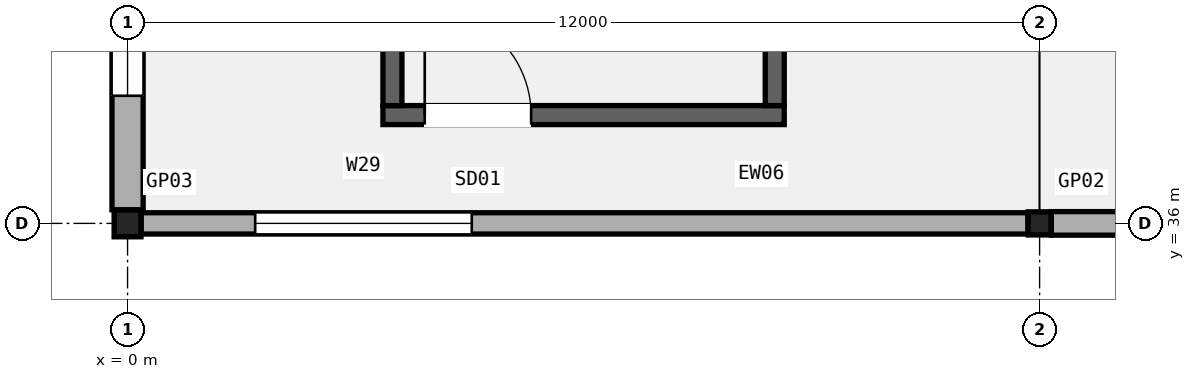
"""IFC4 building model, lengths in metres.
Left out: names, types, materials, properties, quantities, classifications, styles, units other than length and angle.
Written with IfcOpenShell. Run it as: python <this file> out.ifc"""

import sys

from ifc_helpers import new_model, si_unit, direction, frame, frame_2d, origin, origin_2d, place, context, subcontext, project, spatial, rectangle, hollow_rectangle, extrude, element, fill, save


model = new_model("IFC4")
c1 = context("Model", 3, precision=1e-05, world=origin(), true_north=direction((0.0, 1.0)))
c2 = subcontext(c1, "Body", "Model", "MODEL_VIEW")
j1 = project(units=[si_unit("LENGTHUNIT", "METRE"), si_unit("PLANEANGLEUNIT", "RADIAN")], contexts=[c1])
p1 = place(None, origin())
s1 = spatial("IfcSite", under=j1, at=p1, CompositionType="ELEMENT")
p2 = place(p1, origin())
s2 = spatial("IfcBuilding", under=s1, at=p2, CompositionType="ELEMENT")
p3 = place(p2, frame((0.0, 0.0, 25.8)))
s3 = spatial("IfcBuildingStorey", under=s2, at=p3, CompositionType="ELEMENT", Elevation=25.8)
p4 = place(p3, frame((0.0, 36.0, 0.0), z_axis=(0.0, 0.0, 1.0), x_axis=(1.0, 0.0, 0.0)))
e1 = element("IfcColumn", 1, at=p4, inside=s3, PredefinedType="COLUMN", context=c2, shape_type="SweptSolid", body=[
    extrude(hollow_rectangle(XDim=0.35, YDim=0.35, WallThickness=0.016, InnerFilletRadius=0.016, OuterFilletRadius=0.032, at=origin_2d()), origin(), (0.0, 0.0, 1.0), 5.4),
])
p5 = place(p3, frame((12.0, 36.0, 0.0), z_axis=(0.0, 0.0, 1.0), x_axis=(1.0, 0.0, 0.0)))
e2 = element("IfcColumn", 2, at=p5, inside=s3, PredefinedType="COLUMN", context=c2, shape_type="SweptSolid", body=[
    extrude(hollow_rectangle(XDim=0.3, YDim=0.3, WallThickness=0.012, InnerFilletRadius=0.012, OuterFilletRadius=0.024, at=origin_2d()), origin(), (0.0, 0.0, 1.0), 5.4),
])
p6 = place(p3, frame((0.179, 36.0, 0.0), z_axis=(0.0, 0.0, 1.0), x_axis=(1.0, 0.0, 0.0)))
e3 = element("IfcWall", 3, at=p6, inside=s3, PredefinedType="SOLIDWALL", context=c2, shape_type="SweptSolid", body=[
    extrude(rectangle(XDim=11.667, YDim=0.28, at=frame_2d((5.833, 0.0))), origin(), (0.0, 0.0, 1.0), 4.34),
])
p7 = place(p6, frame((1.5, 0.0, 0.95)))
e4 = element("IfcOpeningElement", 4, at=p7, cuts=e3, PredefinedType="OPENING", context=c2, shape_type="SweptSolid", body=[
    extrude(rectangle(XDim=2.85, YDim=2.0, at=frame_2d((1.425, 1.0))), frame((0.0, 0.15, 0.0), z_axis=(0.0, -1.0, 0.0), x_axis=(1.0, 0.0, 0.0)), (0.0, 0.0, 1.0), 0.3),
])
p8 = place(p3, frame((0.0, 36.179, 0.0), z_axis=(0.0, 0.0, 1.0), x_axis=(0.0, 1.0, 0.0)))
e5 = element("IfcWall", 5, at=p8, inside=s3, PredefinedType="SOLIDWALL", context=c2, shape_type="SweptSolid", body=[
    extrude(rectangle(XDim=11.667, YDim=0.41, at=frame_2d((5.833, 0.0))), origin(), (0.0, 0.0, 1.0), 4.34),
])
p9 = place(p8, frame((1.5, 0.0, 0.95)))
e6 = element("IfcOpeningElement", 6, at=p9, cuts=e5, PredefinedType="OPENING", context=c2, shape_type="SweptSolid", body=[
    extrude(rectangle(XDim=3.0, YDim=2.15, at=frame_2d((1.5, 1.075))), frame((0.0, 0.215, 0.0), z_axis=(0.0, -1.0, 0.0), x_axis=(1.0, 0.0, 0.0)), (0.0, 0.0, 1.0), 0.43),
])
p10 = place(p3, frame((12.154, 36.0, 0.0), z_axis=(0.0, 0.0, 1.0), x_axis=(1.0, 0.0, 0.0)))
e7 = element("IfcWall", 7, at=p10, inside=s3, PredefinedType="SOLIDWALL", context=c2, shape_type="SweptSolid", body=[
    extrude(rectangle(XDim=11.717, YDim=0.31, at=frame_2d((5.858, 0.0))), origin(), (0.0, 0.0, 1.0), 4.44),
])
p11 = place(p10, frame((1.5, 0.0, 0.95)))
e8 = element("IfcOpeningElement", 8, at=p11, cuts=e7, PredefinedType="OPENING", context=c2, shape_type="SweptSolid", body=[
    extrude(rectangle(XDim=1.5, YDim=2.25, at=frame_2d((0.75, 1.125))), frame((0.0, 0.165, 0.0), z_axis=(0.0, -1.0, 0.0), x_axis=(1.0, 0.0, 0.0)), (0.0, 0.0, 1.0), 0.33),
])
p12 = place(p3, frame((3.36, 37.425, 0.0), z_axis=(0.0, 0.0, 1.0), x_axis=(1.0, 0.0, 0.0)))
e9 = element("IfcWall", 9, at=p12, inside=s3, PredefinedType="SHEAR", context=c2, shape_type="SweptSolid", body=[
    extrude(rectangle(XDim=5.28, YDim=0.25, at=frame_2d((2.64, 0.0))), origin(), (0.0, 0.0, 1.0), 5.04),
])
p13 = place(p12, frame((0.55, 0.0, 0.0)))
e10 = element("IfcOpeningElement", 10, at=p13, cuts=e9, PredefinedType="OPENING", context=c2, shape_type="SweptSolid", body=[
    extrude(rectangle(XDim=1.4, YDim=2.15, at=frame_2d((0.7, 1.075))), frame((0.0, 0.135, 0.0), z_axis=(0.0, -1.0, 0.0), x_axis=(1.0, 0.0, 0.0)), (0.0, 0.0, 1.0), 0.27),
])
for number, where, z_axis, x_axis in (
    (11, (3.485, 37.55, 0.0), (0.0, 0.0, 1.0), (0.0, 1.0, 0.0)),
    (12, (8.515, 37.55, 0.0), (0.0, 0.0, 1.0), (0.0, 1.0, 0.0)),
):
    element("IfcWall", number, at=place(p3, frame(where, z_axis=z_axis, x_axis=x_axis)), inside=s3, PredefinedType="SHEAR", context=c2, shape_type="SweptSolid", body=[
        extrude(rectangle(XDim=8.9, YDim=0.25, at=frame_2d((4.45, 0.0))), origin(), (0.0, 0.0, 1.0), 5.04),
    ])
p14 = place(p7, origin())
e13 = element("IfcWindow", 13, at=p14, inside=s3, PartitioningType="SINGLE_PANEL", PredefinedType="WINDOW", context=c2, shape_type="SweptSolid", body=[
    extrude(rectangle(XDim=2.85, YDim=2.0, at=frame_2d((1.425, 1.0))), frame((0.0, 0.03, 0.0), z_axis=(0.0, -1.0, 0.0), x_axis=(1.0, 0.0, 0.0)), (0.0, 0.0, 1.0), 0.06),
])
fill(e4, e13)
p15 = place(p9, origin())
e14 = element("IfcWindow", 14, at=p15, inside=s3, PartitioningType="SINGLE_PANEL", PredefinedType="WINDOW", context=c2, shape_type="SweptSolid", body=[
    extrude(rectangle(XDim=3.0, YDim=2.15, at=frame_2d((1.5, 1.075))), frame((0.0, 0.03, 0.0), z_axis=(0.0, -1.0, 0.0), x_axis=(1.0, 0.0, 0.0)), (0.0, 0.0, 1.0), 0.06),
])
fill(e6, e14)
p16 = place(p13, origin())
e15 = element("IfcDoor", 15, at=p16, inside=s3, OperationType="SINGLE_SWING_LEFT", PredefinedType="DOOR", context=c2, shape_type="SweptSolid", body=[
    extrude(rectangle(XDim=1.4, YDim=2.15, at=frame_2d((0.7, 1.075))), frame((0.0, 0.025, 0.0), z_axis=(0.0, -1.0, 0.0), x_axis=(1.0, 0.0, 0.0)), (0.0, 0.0, 1.0), 0.05),
])
fill(e10, e15)
save(model, sys.argv[1])
